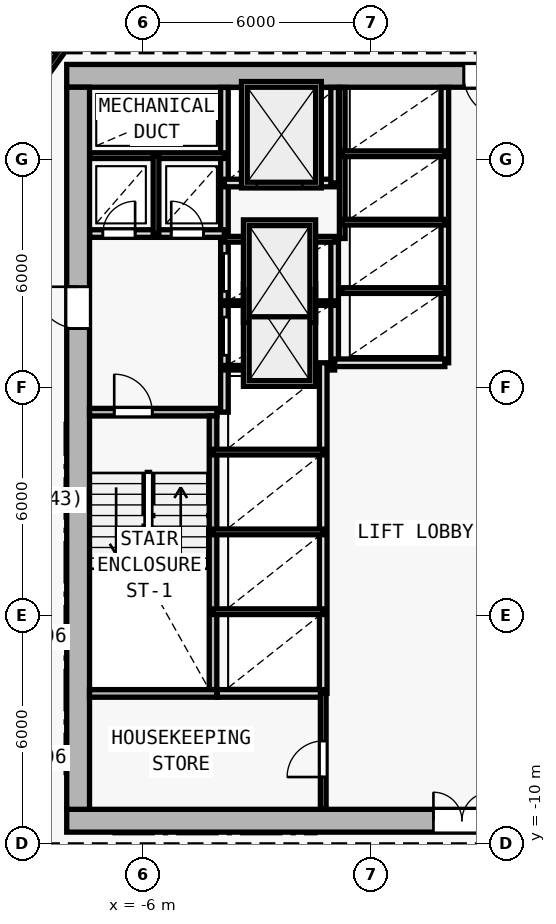
"""IFC4 building model, lengths in metres.
Left out: names, types, materials, properties, quantities, classifications, styles, units other than length and angle.
Written with IfcOpenShell. Run it as: python <this file> out.ifc"""

import sys

from ifc_helpers import new_model, si_unit, direction, frame, frame_2d, origin, origin_2d, place, context, subcontext, project, spatial, rectangle, i_section, extrude, element, fill, save


model = new_model("IFC4")
c1 = context("Model", 3, precision=1e-05, world=origin(), true_north=direction((0.0, 1.0)))
c2 = subcontext(c1, "Body", "Model", "MODEL_VIEW")
j1 = project(units=[si_unit("LENGTHUNIT", "METRE"), si_unit("PLANEANGLEUNIT", "RADIAN")], contexts=[c1])
p1 = place(None, origin())
s1 = spatial("IfcSite", under=j1, at=p1, CompositionType="ELEMENT")
p2 = place(p1, origin())
s2 = spatial("IfcBuilding", under=s1, at=p2, CompositionType="ELEMENT")
p3 = place(p2, frame((0.0, 0.0, 48.0)))
s3 = spatial("IfcBuildingStorey", under=s2, at=p3, CompositionType="ELEMENT", Elevation=48.0)
for number, where, z_axis, x_axis in (
    (1, (-7.7, -9.4, 0.0), (0.0, 0.0, 1.0), (1.0, 0.0, 0.0)),
    (2, (-7.7, 10.2, 0.0), (0.0, 0.0, 1.0), (1.0, 0.0, 0.0)),
    (3, (0.0, -9.4, 0.0), (0.0, 0.0, 1.0), (1.0, 0.0, 0.0)),
    (4, (-7.7, 2.0, 0.0), (0.0, 0.0, 1.0), (1.0, 0.0, 0.0)),
):
    element("IfcColumn", number, at=place(p3, frame(where, z_axis=z_axis, x_axis=x_axis)), inside=s3, PredefinedType="COLUMN", context=c2, shape_type="SweptSolid", body=[
        extrude(i_section(OverallWidth=0.416, OverallDepth=0.446, WebThickness=0.025, FlangeThickness=0.04, FilletRadius=0.015, at=origin_2d()), origin(), (0.0, 0.0, 1.0), 3.6),
    ])
p4 = place(p3, frame((-8.0, -9.4, 0.0), z_axis=(0.0, 0.0, 1.0), x_axis=(1.0, 0.0, 0.0)))
e5 = element("IfcWall", 5, at=p4, inside=s3, PredefinedType="SHEAR", context=c2, shape_type="SweptSolid", body=[
    extrude(rectangle(XDim=16.0, YDim=0.6, at=frame_2d((8.0, 0.0))), origin(), (0.0, 0.0, 1.0), 3.35),
])
p5 = place(p4, frame((9.65, 0.0, 0.0)))
e6 = element("IfcOpeningElement", 6, at=p5, cuts=e5, PredefinedType="OPENING", context=c2, shape_type="SweptSolid", body=[
    extrude(rectangle(XDim=1.5, YDim=2.2, at=frame_2d((0.75, 1.1))), frame((0.0, 0.31, 0.0), z_axis=(0.0, -1.0, 0.0), x_axis=(1.0, 0.0, 0.0)), (0.0, 0.0, 1.0), 0.62),
])
p6 = place(p3, frame((8.0, 10.2, 0.0), z_axis=(0.0, 0.0, 1.0), x_axis=(-1.0, 0.0, 0.0)))
e7 = element("IfcWall", 7, at=p6, inside=s3, PredefinedType="SHEAR", context=c2, shape_type="SweptSolid", body=[
    extrude(rectangle(XDim=16.0, YDim=0.6, at=frame_2d((8.0, 0.0))), origin(), (0.0, 0.0, 1.0), 3.35),
])
p7 = place(p6, frame((4.45, 0.0, 0.0)))
e8 = element("IfcOpeningElement", 8, at=p7, cuts=e7, PredefinedType="OPENING", context=c2, shape_type="SweptSolid", body=[
    extrude(rectangle(XDim=1.1, YDim=2.15, at=frame_2d((0.55, 1.075))), frame((0.0, 0.31, 0.0), z_axis=(0.0, -1.0, 0.0), x_axis=(1.0, 0.0, 0.0)), (0.0, 0.0, 1.0), 0.62),
])
p8 = place(p3, frame((-7.7, -9.1, 0.0), z_axis=(0.0, 0.0, 1.0), x_axis=(0.0, 1.0, 0.0)))
e9 = element("IfcWall", 9, at=p8, inside=s3, PredefinedType="SHEAR", context=c2, shape_type="SweptSolid", body=[
    extrude(rectangle(XDim=19.0, YDim=0.6, at=frame_2d((9.5, 0.0))), origin(), (0.0, 0.0, 1.0), 3.35),
])
p9 = place(p8, frame((12.65, 0.0, 0.0)))
e10 = element("IfcOpeningElement", 10, at=p9, cuts=e9, PredefinedType="OPENING", context=c2, shape_type="SweptSolid", body=[
    extrude(rectangle(XDim=1.1, YDim=2.15, at=frame_2d((0.55, 1.075))), frame((0.0, 0.31, 0.0), z_axis=(0.0, -1.0, 0.0), x_axis=(1.0, 0.0, 0.0)), (0.0, 0.0, 1.0), 0.62),
])
p10 = place(p3, frame((-7.4, 1.35, 0.0), z_axis=(0.0, 0.0, 1.0), x_axis=(1.0, 0.0, 0.0)))
e11 = element("IfcWall", 11, at=p10, inside=s3, PredefinedType="SOLIDWALL", context=c2, shape_type="SweptSolid", body=[
    extrude(rectangle(XDim=3.35, YDim=0.2, at=frame_2d((1.675, 0.0))), origin(), (0.0, 0.0, 1.0), 3.35),
])
p11 = place(p10, frame((0.65, 0.0, 0.0)))
e12 = element("IfcOpeningElement", 12, at=p11, cuts=e11, PredefinedType="OPENING", context=c2, shape_type="SweptSolid", body=[
    extrude(rectangle(XDim=1.0, YDim=2.15, at=frame_2d((0.5, 1.075))), frame((0.0, 0.11, 0.0), z_axis=(0.0, -1.0, 0.0), x_axis=(1.0, 0.0, 0.0)), (0.0, 0.0, 1.0), 0.22),
])
p12 = place(p3, frame((-4.15, -5.95, 0.0), z_axis=(0.0, 0.0, 1.0), x_axis=(0.0, 1.0, 0.0)))
e13 = element("IfcWall", 13, at=p12, inside=s3, PredefinedType="SOLIDWALL", context=c2, shape_type="SweptSolid", body=[
    extrude(rectangle(XDim=7.2, YDim=0.2, at=frame_2d((3.6, 0.0))), origin(), (0.0, 0.0, 1.0), 3.35),
])
p13 = place(p3, frame((-3.85, 1.35, 0.0), z_axis=(0.0, 0.0, 1.0), x_axis=(0.0, 1.0, 0.0)))
e14 = element("IfcWall", 14, at=p13, inside=s3, PredefinedType="SOLIDWALL", context=c2, shape_type="SweptSolid", body=[
    extrude(rectangle(XDim=8.545, YDim=0.2, at=frame_2d((4.272, 0.0))), origin(), (0.0, 0.0, 1.0), 3.35),
])
p14 = place(p13, frame((1.5, 0.0, 0.0)))
e15 = element("IfcOpeningElement", 15, at=p14, cuts=e14, PredefinedType="OPENING", context=c2, shape_type="SweptSolid", body=[
    extrude(rectangle(XDim=1.0, YDim=2.15, at=frame_2d((0.5, 1.075))), frame((0.0, 0.11, 0.0), z_axis=(0.0, -1.0, 0.0), x_axis=(1.0, 0.0, 0.0)), (0.0, 0.0, 1.0), 0.22),
])
p15 = place(p13, frame((3.18, 0.0, 0.0)))
e16 = element("IfcOpeningElement", 16, at=p15, cuts=e14, PredefinedType="OPENING", context=c2, shape_type="SweptSolid", body=[
    extrude(rectangle(XDim=1.0, YDim=2.15, at=frame_2d((0.5, 1.075))), frame((0.0, 0.11, 0.0), z_axis=(0.0, -1.0, 0.0), x_axis=(1.0, 0.0, 0.0)), (0.0, 0.0, 1.0), 0.22),
])
p16 = place(p3, frame((-7.395, 6.05, 0.0), z_axis=(0.0, 0.0, 1.0), x_axis=(1.0, 0.0, 0.0)))
e17 = element("IfcWall", 17, at=p16, inside=s3, PredefinedType="SOLIDWALL", context=c2, shape_type="SweptSolid", body=[
    extrude(rectangle(XDim=3.545, YDim=0.2, at=frame_2d((1.772, 0.0))), origin(), (0.0, 0.0, 1.0), 3.35),
])
p17 = place(p16, frame((0.345, 0.0, 0.0)))
e18 = element("IfcOpeningElement", 18, at=p17, cuts=e17, PredefinedType="OPENING", context=c2, shape_type="SweptSolid", body=[
    extrude(rectangle(XDim=0.85, YDim=2.1, at=frame_2d((0.425, 1.05))), frame((0.0, 0.11, 0.0), z_axis=(0.0, -1.0, 0.0), x_axis=(1.0, 0.0, 0.0)), (0.0, 0.0, 1.0), 0.22),
])
p18 = place(p16, frame((2.145, 0.0, 0.0)))
e19 = element("IfcOpeningElement", 19, at=p18, cuts=e17, PredefinedType="OPENING", context=c2, shape_type="SweptSolid", body=[
    extrude(rectangle(XDim=0.85, YDim=2.1, at=frame_2d((0.425, 1.05))), frame((0.0, 0.11, 0.0), z_axis=(0.0, -1.0, 0.0), x_axis=(1.0, 0.0, 0.0)), (0.0, 0.0, 1.0), 0.22),
])
p19 = place(p3, frame((-7.395, 8.1, 0.0), z_axis=(0.0, 0.0, 1.0), x_axis=(1.0, 0.0, 0.0)))
e20 = element("IfcWall", 20, at=p19, inside=s3, PredefinedType="PARTITIONING", context=c2, shape_type="SweptSolid", body=[
    extrude(rectangle(XDim=3.545, YDim=0.15, at=frame_2d((1.772, 0.0))), origin(), (0.0, 0.0, 1.0), 3.35),
])
p20 = place(p3, frame((-5.65, 6.05, 0.0), z_axis=(0.0, 0.0, 1.0), x_axis=(0.0, 1.0, 0.0)))
e21 = element("IfcWall", 21, at=p20, inside=s3, PredefinedType="PARTITIONING", context=c2, shape_type="SweptSolid", body=[
    extrude(rectangle(XDim=2.05, YDim=0.15, at=frame_2d((1.025, 0.0))), origin(), (0.0, 0.0, 1.0), 3.35),
])
p21 = place(p3, frame((-0.95, 2.65, 0.0), z_axis=(0.0, 0.0, 1.0), x_axis=(0.0, 1.0, 0.0)))
e22 = element("IfcWall", 22, at=p21, inside=s3, PredefinedType="SOLIDWALL", context=c2, shape_type="SweptSolid", body=[
    extrude(rectangle(XDim=3.27, YDim=0.2, at=frame_2d((1.635, 0.0))), origin(), (0.0, 0.0, 1.0), 3.35),
])
for number, where, z_axis, x_axis in (
    (23, (-3.85, 2.52, 0.0), (0.0, 0.0, 1.0), (1.0, 0.0, 0.0)),
    (24, (-3.85, 4.22, 0.0), (0.0, 0.0, 1.0), (1.0, 0.0, 0.0)),
):
    element("IfcWall", number, at=place(p3, frame(where, z_axis=z_axis, x_axis=x_axis)), inside=s3, PredefinedType="PARTITIONING", context=c2, shape_type="SweptSolid", body=[
        extrude(rectangle(XDim=2.9, YDim=0.12, at=frame_2d((1.45, 0.0))), origin(), (0.0, 0.0, 1.0), 3.35),
    ])
p22 = place(p3, frame((-3.85, 5.9, 0.0), z_axis=(0.0, 0.0, 1.0), x_axis=(1.0, 0.0, 0.0)))
e25 = element("IfcWall", 25, at=p22, inside=s3, PredefinedType="PARTITIONING", context=c2, shape_type="SweptSolid", body=[
    extrude(rectangle(XDim=2.9, YDim=0.15, at=frame_2d((1.45, 0.0))), origin(), (0.0, 0.0, 1.0), 3.35),
])
p23 = place(p3, frame((-3.85, 7.38, 0.0), z_axis=(0.0, 0.0, 1.0), x_axis=(1.0, 0.0, 0.0)))
e26 = element("IfcWall", 26, at=p23, inside=s3, PredefinedType="SOLIDWALL", context=c2, shape_type="SweptSolid", body=[
    extrude(rectangle(XDim=2.9, YDim=0.2, at=frame_2d((1.45, 0.0))), origin(), (0.0, 0.0, 1.0), 3.35),
])
p24 = place(p23, frame((0.85, 0.0, 0.0)))
e27 = element("IfcOpeningElement", 27, at=p24, cuts=e26, PredefinedType="OPENING", context=c2, shape_type="SweptSolid", body=[
    extrude(rectangle(XDim=1.2, YDim=2.2, at=frame_2d((0.6, 1.1))), frame((0.0, 0.11, 0.0), z_axis=(0.0, -1.0, 0.0), x_axis=(1.0, 0.0, 0.0)), (0.0, 0.0, 1.0), 0.22),
])
p25 = place(p3, frame((-0.95, 7.38, 0.0), z_axis=(0.0, 0.0, 1.0), x_axis=(0.0, 1.0, 0.0)))
e28 = element("IfcWall", 28, at=p25, inside=s3, PredefinedType="SOLIDWALL", context=c2, shape_type="SweptSolid", body=[
    extrude(rectangle(XDim=2.515, YDim=0.2, at=frame_2d((1.258, 0.0))), origin(), (0.0, 0.0, 1.0), 3.35),
])
p26 = place(p3, frame((-1.25, -6.05, 0.0), z_axis=(0.0, 0.0, 1.0), x_axis=(0.0, 1.0, 0.0)))
e29 = element("IfcWall", 29, at=p26, inside=s3, PredefinedType="SOLIDWALL", context=c2, shape_type="SweptSolid", body=[
    extrude(rectangle(XDim=8.7, YDim=0.2, at=frame_2d((4.35, 0.0))), origin(), (0.0, 0.0, 1.0), 3.35),
])
for number, where, z_axis, x_axis in (
    (30, (-4.15, -3.9, 0.0), (0.0, 0.0, 1.0), (1.0, 0.0, 0.0)),
    (31, (-4.15, -1.8, 0.0), (0.0, 0.0, 1.0), (1.0, 0.0, 0.0)),
    (32, (-4.15, 0.3, 0.0), (0.0, 0.0, 1.0), (1.0, 0.0, 0.0)),
):
    element("IfcWall", number, at=place(p3, frame(where, z_axis=z_axis, x_axis=x_axis)), inside=s3, PredefinedType="PARTITIONING", context=c2, shape_type="SweptSolid", body=[
        extrude(rectangle(XDim=2.9, YDim=0.15, at=frame_2d((1.45, 0.0))), origin(), (0.0, 0.0, 1.0), 3.35),
    ])
p27 = place(p3, frame((1.95, 2.65, 0.0), z_axis=(0.0, 0.0, 1.0), x_axis=(0.0, 1.0, 0.0)))
e33 = element("IfcWall", 33, at=p27, inside=s3, PredefinedType="SOLIDWALL", context=c2, shape_type="SweptSolid", body=[
    extrude(rectangle(XDim=7.245, YDim=0.2, at=frame_2d((3.623, 0.0))), origin(), (0.0, 0.0, 1.0), 3.35),
])
p28 = place(p3, frame((-0.95, 2.65, 0.0), z_axis=(0.0, 0.0, 1.0), x_axis=(1.0, 0.0, 0.0)))
e34 = element("IfcWall", 34, at=p28, inside=s3, PredefinedType="SOLIDWALL", context=c2, shape_type="SweptSolid", body=[
    extrude(rectangle(XDim=2.9, YDim=0.2, at=frame_2d((1.45, 0.0))), origin(), (0.0, 0.0, 1.0), 3.35),
])
p29 = place(p3, frame((-0.75, 5.92, 0.0), z_axis=(0.0, 0.0, 1.0), x_axis=(0.0, 1.0, 0.0)))
e35 = element("IfcWall", 35, at=p29, inside=s3, PredefinedType="PARTITIONING", context=c2, shape_type="SweptSolid", body=[
    extrude(rectangle(XDim=3.975, YDim=0.15, at=frame_2d((1.988, 0.0))), origin(), (0.0, 0.0, 1.0), 3.35),
])
for number, where, z_axis, x_axis in (
    (36, (-0.75, 4.55, 0.0), (0.0, 0.0, 1.0), (1.0, 0.0, 0.0)),
    (37, (-0.75, 6.35, 0.0), (0.0, 0.0, 1.0), (1.0, 0.0, 0.0)),
    (38, (-0.75, 8.15, 0.0), (0.0, 0.0, 1.0), (1.0, 0.0, 0.0)),
):
    element("IfcWall", number, at=place(p3, frame(where, z_axis=z_axis, x_axis=x_axis)), inside=s3, PredefinedType="PARTITIONING", context=c2, shape_type="SweptSolid", body=[
        extrude(rectangle(XDim=2.7, YDim=0.15, at=frame_2d((1.35, 0.0))), origin(), (0.0, 0.0, 1.0), 3.35),
    ])
p30 = place(p3, frame((-7.4, -6.05, 0.0), z_axis=(0.0, 0.0, 1.0), x_axis=(1.0, 0.0, 0.0)))
e39 = element("IfcWall", 39, at=p30, inside=s3, PredefinedType="SOLIDWALL", context=c2, shape_type="SweptSolid", body=[
    extrude(rectangle(XDim=3.35, YDim=0.2, at=frame_2d((1.675, 0.0))), origin(), (0.0, 0.0, 1.0), 3.35),
])
p31 = place(p3, frame((-4.04, -6.05, 0.0), z_axis=(0.0, 0.0, 1.0), x_axis=(1.0, 0.0, 0.0)))
e40 = element("IfcWall", 40, at=p31, inside=s3, PredefinedType="SOLIDWALL", context=c2, shape_type="SweptSolid", body=[
    extrude(rectangle(XDim=2.79, YDim=0.2, at=frame_2d((1.395, 0.0))), origin(), (0.0, 0.0, 1.0), 3.35),
])
p32 = place(p3, frame((-1.25, -9.095, 0.0), z_axis=(0.0, 0.0, 1.0), x_axis=(0.0, 1.0, 0.0)))
e41 = element("IfcWall", 41, at=p32, inside=s3, PredefinedType="PARTITIONING", context=c2, shape_type="SweptSolid", body=[
    extrude(rectangle(XDim=3.045, YDim=0.15, at=frame_2d((1.522, 0.0))), origin(), (0.0, 0.0, 1.0), 3.35),
])
p33 = place(p32, frame((0.845, 0.0, 0.0)))
e42 = element("IfcOpeningElement", 42, at=p33, cuts=e41, PredefinedType="OPENING", context=c2, shape_type="SweptSolid", body=[
    extrude(rectangle(XDim=0.95, YDim=2.1, at=frame_2d((0.475, 1.05))), frame((0.0, 0.085, 0.0), z_axis=(0.0, -1.0, 0.0), x_axis=(1.0, 0.0, 0.0)), (0.0, 0.0, 1.0), 0.17),
])
p34 = place(p3, frame((-9.86, 8.426, 0.0), z_axis=(0.0, 0.0, 1.0), x_axis=(0.582449511476, 0.812866881218, 0.0)))
e43 = element("IfcWall", 43, at=p34, inside=s3, PredefinedType="PARTITIONING", context=c2, shape_type="SweptSolid", body=[
    extrude(rectangle(XDim=4.84, YDim=0.15, at=frame_2d((2.42, 0.0))), origin(), (0.0, 0.0, 1.0), 2.725),
])
p35 = place(p5, origin())
e44 = element("IfcDoor", 44, at=p35, inside=s3, OperationType="DOUBLE_DOOR_SINGLE_SWING", PredefinedType="DOOR", context=c2, shape_type="SweptSolid", body=[
    extrude(rectangle(XDim=1.5, YDim=2.2, at=frame_2d((0.75, 1.1))), frame((0.0, 0.025, 0.0), z_axis=(0.0, -1.0, 0.0), x_axis=(1.0, 0.0, 0.0)), (0.0, 0.0, 1.0), 0.05),
])
fill(e6, e44)
p36 = place(p9, origin())
e45 = element("IfcDoor", 45, at=p36, inside=s3, OperationType="SINGLE_SWING_RIGHT", PredefinedType="DOOR", context=c2, shape_type="SweptSolid", body=[
    extrude(rectangle(XDim=1.1, YDim=2.15, at=frame_2d((0.55, 1.075))), frame((0.0, 0.025, 0.0), z_axis=(0.0, -1.0, 0.0), x_axis=(1.0, 0.0, 0.0)), (0.0, 0.0, 1.0), 0.05),
])
fill(e10, e45)
p37 = place(p7, origin())
e46 = element("IfcDoor", 46, at=p37, inside=s3, OperationType="SINGLE_SWING_LEFT", PredefinedType="DOOR", context=c2, shape_type="SweptSolid", body=[
    extrude(rectangle(XDim=1.1, YDim=2.15, at=frame_2d((0.55, 1.075))), frame((0.0, 0.025, 0.0), z_axis=(0.0, -1.0, 0.0), x_axis=(1.0, 0.0, 0.0)), (0.0, 0.0, 1.0), 0.05),
])
fill(e8, e46)
p38 = place(p11, origin())
e47 = element("IfcDoor", 47, at=p38, inside=s3, OperationType="SINGLE_SWING_LEFT", PredefinedType="DOOR", context=c2, shape_type="SweptSolid", body=[
    extrude(rectangle(XDim=1.0, YDim=2.15, at=frame_2d((0.5, 1.075))), frame((0.0, 0.025, 0.0), z_axis=(0.0, -1.0, 0.0), x_axis=(1.0, 0.0, 0.0)), (0.0, 0.0, 1.0), 0.05),
])
fill(e12, e47)
p39 = place(p17, origin())
e48 = element("IfcDoor", 48, at=p39, inside=s3, OperationType="SINGLE_SWING_RIGHT", PredefinedType="DOOR", context=c2, shape_type="SweptSolid", body=[
    extrude(rectangle(XDim=0.85, YDim=2.1, at=frame_2d((0.425, 1.05))), frame((0.0, 0.025, 0.0), z_axis=(0.0, -1.0, 0.0), x_axis=(1.0, 0.0, 0.0)), (0.0, 0.0, 1.0), 0.05),
])
fill(e18, e48)
p40 = place(p18, origin())
e49 = element("IfcDoor", 49, at=p40, inside=s3, OperationType="SINGLE_SWING_LEFT", PredefinedType="DOOR", context=c2, shape_type="SweptSolid", body=[
    extrude(rectangle(XDim=0.85, YDim=2.1, at=frame_2d((0.425, 1.05))), frame((0.0, 0.025, 0.0), z_axis=(0.0, -1.0, 0.0), x_axis=(1.0, 0.0, 0.0)), (0.0, 0.0, 1.0), 0.05),
])
fill(e19, e49)
p41 = place(p24, origin())
e50 = element("IfcDoor", 50, at=p41, inside=s3, OperationType="DOUBLE_DOOR_SLIDING", PredefinedType="DOOR", context=c2, shape_type="SweptSolid", body=[
    extrude(rectangle(XDim=1.2, YDim=2.2, at=frame_2d((0.6, 1.1))), frame((0.0, 0.025, 0.0), z_axis=(0.0, -1.0, 0.0), x_axis=(1.0, 0.0, 0.0)), (0.0, 0.0, 1.0), 0.05),
])
fill(e27, e50)
p42 = place(p14, origin())
e51 = element("IfcDoor", 51, at=p42, inside=s3, OperationType="DOUBLE_DOOR_SLIDING", PredefinedType="DOOR", context=c2, shape_type="SweptSolid", body=[
    extrude(rectangle(XDim=1.0, YDim=2.15, at=frame_2d((0.5, 1.075))), frame((0.0, 0.025, 0.0), z_axis=(0.0, -1.0, 0.0), x_axis=(1.0, 0.0, 0.0)), (0.0, 0.0, 1.0), 0.05),
])
fill(e15, e51)
p43 = place(p15, origin())
e52 = element("IfcDoor", 52, at=p43, inside=s3, OperationType="DOUBLE_DOOR_SLIDING", PredefinedType="DOOR", context=c2, shape_type="SweptSolid", body=[
    extrude(rectangle(XDim=1.0, YDim=2.15, at=frame_2d((0.5, 1.075))), frame((0.0, 0.025, 0.0), z_axis=(0.0, -1.0, 0.0), x_axis=(1.0, 0.0, 0.0)), (0.0, 0.0, 1.0), 0.05),
])
fill(e16, e52)
p44 = place(p33, origin())
e53 = element("IfcDoor", 53, at=p44, inside=s3, OperationType="SINGLE_SWING_LEFT", PredefinedType="DOOR", context=c2, shape_type="SweptSolid", body=[
    extrude(rectangle(XDim=0.95, YDim=2.1, at=frame_2d((0.475, 1.05))), frame((0.0, 0.025, 0.0), z_axis=(0.0, -1.0, 0.0), x_axis=(1.0, 0.0, 0.0)), (0.0, 0.0, 1.0), 0.05),
])
fill(e42, e53)
save(model, sys.argv[1])
